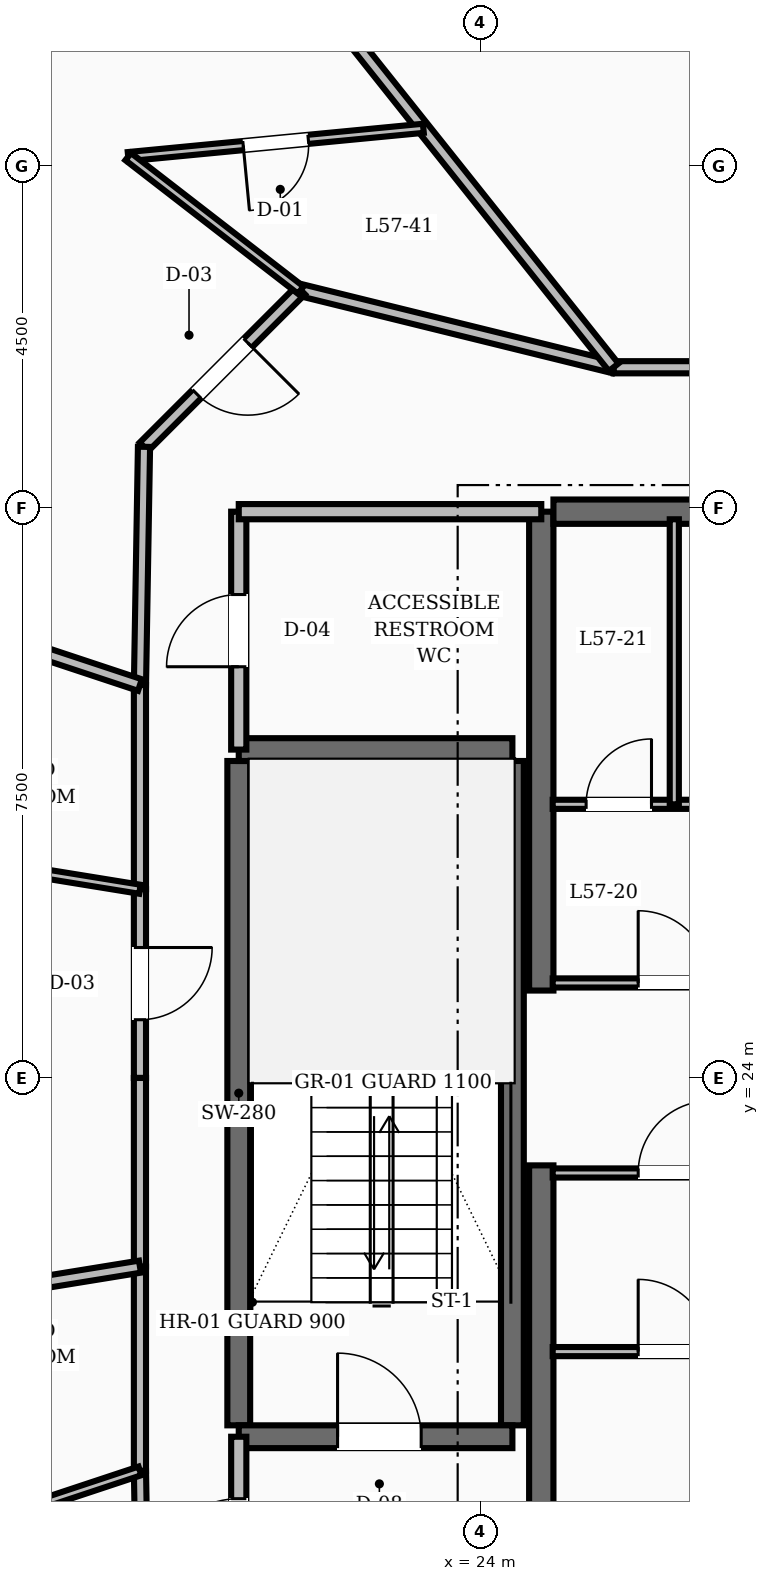
"""IFC4 building model, lengths in metres.
Left out: names, types, materials, properties, quantities, classifications, styles, units other than length and angle.
Written with IfcOpenShell. Run it as: python <this file> out.ifc"""

import sys

from ifc_helpers import new_model, si_unit, direction, frame, frame_2d, origin, place, context, subcontext, project, spatial, rectangle, extrude, element, fill, save


model = new_model("IFC4")
c1 = context("Model", 3, precision=1e-05, world=origin(), true_north=direction((0.0, 1.0)))
c2 = subcontext(c1, "Body", "Model", "MODEL_VIEW")
j1 = project(units=[si_unit("LENGTHUNIT", "METRE"), si_unit("PLANEANGLEUNIT", "RADIAN")], contexts=[c1])
p1 = place(None, origin())
s1 = spatial("IfcSite", under=j1, at=p1, CompositionType="ELEMENT")
p2 = place(p1, origin())
s2 = spatial("IfcBuilding", under=s1, at=p2, CompositionType="ELEMENT")
p3 = place(p2, frame((0.0, 0.0, 222.0)))
s3 = spatial("IfcBuildingStorey", under=s2, at=p3, CompositionType="ELEMENT", Elevation=222.0)
for number, where, z_axis, x_axis in (
    (1, (24.8, 16.55, 0.0), (0.0, 0.0, 1.0), (0.0, 1.0, 0.0)),
    (2, (24.8, 25.15, 0.0), (0.0, 0.0, 1.0), (0.0, 1.0, 0.0)),
):
    element("IfcWall", number, at=place(p3, frame(where, z_axis=z_axis, x_axis=x_axis)), inside=s3, PredefinedType="SHEAR", context=c2, shape_type="SweptSolid", body=[
        extrude(rectangle(XDim=6.3, YDim=0.32, at=frame_2d((3.15, 0.0))), origin(), (0.0, 0.0, 1.0), 3.6),
    ])
p4 = place(p3, frame((24.96, 31.45, 0.0), z_axis=(0.0, 0.0, 1.0), x_axis=(1.0, 0.0, 0.0)))
e3 = element("IfcWall", 3, at=p4, inside=s3, PredefinedType="SHEAR", context=c2, shape_type="SweptSolid", body=[
    extrude(rectangle(XDim=3.24, YDim=0.32, at=frame_2d((1.62, 0.0))), origin(), (0.0, 0.0, 1.0), 3.6),
])
for number, where, z_axis, x_axis in (
    (4, (20.82, 19.43, 0.0), (0.0, 0.0, 1.0), (0.0, 1.0, 0.0)),
    (5, (24.42, 19.43, 0.0), (0.0, 0.0, 1.0), (0.0, 1.0, 0.0)),
):
    element("IfcWall", number, at=place(p3, frame(where, z_axis=z_axis, x_axis=x_axis)), inside=s3, PredefinedType="SHEAR", context=c2, shape_type="SweptSolid", body=[
        extrude(rectangle(XDim=8.74, YDim=0.3, at=frame_2d((4.37, 0.0))), origin(), (0.0, 0.0, 1.0), 3.6),
    ])
p5 = place(p3, frame((20.82, 19.28, 0.0), z_axis=(0.0, 0.0, 1.0), x_axis=(1.0, 0.0, 0.0)))
e6 = element("IfcWall", 6, at=p5, inside=s3, PredefinedType="SHEAR", context=c2, shape_type="SweptSolid", body=[
    extrude(rectangle(XDim=3.6, YDim=0.3, at=frame_2d((1.8, 0.0))), origin(), (0.0, 0.0, 1.0), 3.6),
])
p6 = place(p5, frame((1.3, 0.0, 0.0)))
e7 = element("IfcOpeningElement", 7, at=p6, cuts=e6, PredefinedType="OPENING", context=c2, shape_type="SweptSolid", body=[
    extrude(rectangle(XDim=1.1, YDim=2.1, at=frame_2d((0.55, 1.05))), frame((0.0, 0.16, 0.0), z_axis=(0.0, -1.0, 0.0), x_axis=(1.0, 0.0, 0.0)), (0.0, 0.0, 1.0), 0.32),
])
p7 = place(p3, frame((20.82, 28.32, 0.0), z_axis=(0.0, 0.0, 1.0), x_axis=(1.0, 0.0, 0.0)))
e8 = element("IfcWall", 8, at=p7, inside=s3, PredefinedType="SHEAR", context=c2, shape_type="SweptSolid", body=[
    extrude(rectangle(XDim=3.6, YDim=0.3, at=frame_2d((1.8, 0.0))), origin(), (0.0, 0.0, 1.0), 3.6),
])
p8 = place(p3, frame((20.82, 16.55, 0.0), z_axis=(0.0, 0.0, 1.0), x_axis=(0.0, 1.0, 0.0)))
e9 = element("IfcWall", 9, at=p8, inside=s3, PredefinedType="SOLIDWALL", context=c2, shape_type="SweptSolid", body=[
    extrude(rectangle(XDim=2.73, YDim=0.2, at=frame_2d((1.365, 0.0))), origin(), (0.0, 0.0, 1.0), 2.87),
])
p9 = place(p8, frame((0.815, 0.0, 0.0)))
e10 = element("IfcOpeningElement", 10, at=p9, cuts=e9, PredefinedType="OPENING", context=c2, shape_type="SweptSolid", body=[
    extrude(rectangle(XDim=1.1, YDim=2.1, at=frame_2d((0.55, 1.05))), frame((0.0, 0.11, 0.0), z_axis=(0.0, -1.0, 0.0), x_axis=(1.0, 0.0, 0.0)), (0.0, 0.0, 1.0), 0.22),
])
p10 = place(p3, frame((20.82, 28.32, 0.0), z_axis=(0.0, 0.0, 1.0), x_axis=(0.0, 1.0, 0.0)))
e11 = element("IfcWall", 11, at=p10, inside=s3, PredefinedType="SOLIDWALL", context=c2, shape_type="SweptSolid", body=[
    extrude(rectangle(XDim=3.13, YDim=0.2, at=frame_2d((1.565, 0.0))), origin(), (0.0, 0.0, 1.0), 2.87),
])
p11 = place(p10, frame((1.09, 0.0, 0.0)))
e12 = element("IfcOpeningElement", 12, at=p11, cuts=e11, PredefinedType="OPENING", context=c2, shape_type="SweptSolid", body=[
    extrude(rectangle(XDim=0.95, YDim=2.1, at=frame_2d((0.475, 1.05))), frame((0.0, 0.11, 0.0), z_axis=(0.0, -1.0, 0.0), x_axis=(1.0, 0.0, 0.0)), (0.0, 0.0, 1.0), 0.22),
])
p12 = place(p3, frame((20.82, 31.45, 0.0), z_axis=(0.0, 0.0, 1.0), x_axis=(1.0, 0.0, 0.0)))
e13 = element("IfcWall", 13, at=p12, inside=s3, PredefinedType="SOLIDWALL", context=c2, shape_type="SweptSolid", body=[
    extrude(rectangle(XDim=3.98, YDim=0.2, at=frame_2d((1.99, 0.0))), origin(), (0.0, 0.0, 1.0), 2.87),
])
p13 = place(p3, frame((24.95, 25.25, 0.0), z_axis=(0.0, 0.0, 1.0), x_axis=(1.0, 0.0, 0.0)))
e14 = element("IfcWall", 14, at=p13, inside=s3, PredefinedType="PARTITIONING", context=c2, shape_type="SweptSolid", body=[
    extrude(rectangle(XDim=3.2, YDim=0.12, at=frame_2d((1.6, 0.0))), origin(), (0.0, 0.0, 1.0), 2.87),
])
p14 = place(p13, frame((1.125, 0.0, 0.0)))
e15 = element("IfcOpeningElement", 15, at=p14, cuts=e14, PredefinedType="OPENING", context=c2, shape_type="SweptSolid", body=[
    extrude(rectangle(XDim=0.95, YDim=2.1, at=frame_2d((0.475, 1.05))), frame((0.0, 0.07, 0.0), z_axis=(0.0, -1.0, 0.0), x_axis=(1.0, 0.0, 0.0)), (0.0, 0.0, 1.0), 0.14),
])
p15 = place(p3, frame((24.95, 22.75, 0.0), z_axis=(0.0, 0.0, 1.0), x_axis=(1.0, 0.0, 0.0)))
e16 = element("IfcWall", 16, at=p15, inside=s3, PredefinedType="PARTITIONING", context=c2, shape_type="SweptSolid", body=[
    extrude(rectangle(XDim=3.2, YDim=0.12, at=frame_2d((1.6, 0.0))), origin(), (0.0, 0.0, 1.0), 2.87),
])
p16 = place(p15, frame((1.125, 0.0, 0.0)))
e17 = element("IfcOpeningElement", 17, at=p16, cuts=e16, PredefinedType="OPENING", context=c2, shape_type="SweptSolid", body=[
    extrude(rectangle(XDim=0.95, YDim=2.1, at=frame_2d((0.475, 1.05))), frame((0.0, 0.07, 0.0), z_axis=(0.0, -1.0, 0.0), x_axis=(1.0, 0.0, 0.0)), (0.0, 0.0, 1.0), 0.14),
])
p17 = place(p3, frame((24.95, 27.6, 0.0), z_axis=(0.0, 0.0, 1.0), x_axis=(1.0, 0.0, 0.0)))
e18 = element("IfcWall", 18, at=p17, inside=s3, PredefinedType="PARTITIONING", context=c2, shape_type="SweptSolid", body=[
    extrude(rectangle(XDim=3.2, YDim=0.12, at=frame_2d((1.6, 0.0))), origin(), (0.0, 0.0, 1.0), 2.87),
])
p18 = place(p17, frame((0.44, 0.0, 0.0)))
e19 = element("IfcOpeningElement", 19, at=p18, cuts=e18, PredefinedType="OPENING", context=c2, shape_type="SweptSolid", body=[
    extrude(rectangle(XDim=0.86, YDim=2.1, at=frame_2d((0.43, 1.05))), frame((0.0, 0.07, 0.0), z_axis=(0.0, -1.0, 0.0), x_axis=(1.0, 0.0, 0.0)), (0.0, 0.0, 1.0), 0.14),
])
p19 = place(p17, frame((1.9, 0.0, 0.0)))
e20 = element("IfcOpeningElement", 20, at=p19, cuts=e18, PredefinedType="OPENING", context=c2, shape_type="SweptSolid", body=[
    extrude(rectangle(XDim=0.86, YDim=2.1, at=frame_2d((0.43, 1.05))), frame((0.0, 0.07, 0.0), z_axis=(0.0, -1.0, 0.0), x_axis=(1.0, 0.0, 0.0)), (0.0, 0.0, 1.0), 0.14),
])
p20 = place(p3, frame((26.55, 27.6, 0.0), z_axis=(0.0, 0.0, 1.0), x_axis=(0.0, 1.0, 0.0)))
e21 = element("IfcWall", 21, at=p20, inside=s3, PredefinedType="PARTITIONING", context=c2, shape_type="SweptSolid", body=[
    extrude(rectangle(XDim=3.75, YDim=0.12, at=frame_2d((1.875, 0.0))), origin(), (0.0, 0.0, 1.0), 2.87),
])
p21 = place(p3, frame((24.95, 20.4, 0.0), z_axis=(0.0, 0.0, 1.0), x_axis=(1.0, 0.0, 0.0)))
e22 = element("IfcWall", 22, at=p21, inside=s3, PredefinedType="PARTITIONING", context=c2, shape_type="SweptSolid", body=[
    extrude(rectangle(XDim=3.2, YDim=0.12, at=frame_2d((1.6, 0.0))), origin(), (0.0, 0.0, 1.0), 2.87),
])
p22 = place(p21, frame((1.125, 0.0, 0.0)))
e23 = element("IfcOpeningElement", 23, at=p22, cuts=e22, PredefinedType="OPENING", context=c2, shape_type="SweptSolid", body=[
    extrude(rectangle(XDim=0.95, YDim=2.1, at=frame_2d((0.475, 1.05))), frame((0.0, 0.07, 0.0), z_axis=(0.0, -1.0, 0.0), x_axis=(1.0, 0.0, 0.0)), (0.0, 0.0, 1.0), 0.14),
])
p23 = place(p3, frame((28.127, 33.35, 0.0), z_axis=(0.0, 0.0, 1.0), x_axis=(-1.0, 0.0, 0.0)))
e24 = element("IfcWall", 24, at=p23, inside=s3, PredefinedType="SOLIDWALL", context=c2, shape_type="SweptSolid", body=[
    extrude(rectangle(XDim=2.375, YDim=0.16, at=frame_2d((1.188, 0.0))), origin(), (0.0, 0.0, 1.0), 2.87),
])
p24 = place(p3, frame((25.752, 33.35, 0.0), z_axis=(0.0, 0.0, 1.0), x_axis=(-0.970939799552, 0.239323850978, 0.0)))
e25 = element("IfcWall", 25, at=p24, inside=s3, PredefinedType="SOLIDWALL", context=c2, shape_type="SweptSolid", body=[
    extrude(rectangle(XDim=4.241, YDim=0.16, at=frame_2d((2.12, 0.0))), origin(), (0.0, 0.0, 1.0), 2.87),
])
p25 = place(p3, frame((21.635, 34.365, 0.0), z_axis=(0.0, 0.0, 1.0), x_axis=(-0.707106781187, -0.707106781187, 0.0)))
e26 = element("IfcWall", 26, at=p25, inside=s3, PredefinedType="SOLIDWALL", context=c2, shape_type="SweptSolid", body=[
    extrude(rectangle(XDim=2.916, YDim=0.16, at=frame_2d((1.458, 0.0))), origin(), (0.0, 0.0, 1.0), 2.87),
])
p26 = place(p25, frame((0.983, 0.0, 0.0)))
e27 = element("IfcOpeningElement", 27, at=p26, cuts=e26, PredefinedType="OPENING", context=c2, shape_type="SweptSolid", body=[
    extrude(rectangle(XDim=0.95, YDim=2.1, at=frame_2d((0.475, 1.05))), frame((0.0, 0.09, 0.0), z_axis=(0.0, -1.0, 0.0), x_axis=(1.0, 0.0, 0.0)), (0.0, 0.0, 1.0), 0.18),
])
p27 = place(p3, frame((19.573, 32.303, 0.0), z_axis=(0.0, 0.0, 1.0), x_axis=(-0.016981035134, -0.999855811828, 0.0)))
e28 = element("IfcWall", 28, at=p27, inside=s3, PredefinedType="SOLIDWALL", context=c2, shape_type="SweptSolid", body=[
    extrude(rectangle(XDim=3.134, YDim=0.16, at=frame_2d((1.567, 0.0))), origin(), (0.0, 0.0, 1.0), 2.87),
])
p28 = place(p3, frame((19.52, 29.169, 0.0), z_axis=(0.0, 0.0, 1.0), x_axis=(0.0, -1.0, 0.0)))
e29 = element("IfcWall", 29, at=p28, inside=s3, PredefinedType="SOLIDWALL", context=c2, shape_type="SweptSolid", body=[
    extrude(rectangle(XDim=2.687, YDim=0.16, at=frame_2d((1.344, 0.0))), origin(), (0.0, 0.0, 1.0), 2.87),
])
p29 = place(p3, frame((19.52, 26.482, 0.0), z_axis=(0.0, 0.0, 1.0), x_axis=(0.0, -1.0, 0.0)))
e30 = element("IfcWall", 30, at=p29, inside=s3, PredefinedType="SOLIDWALL", context=c2, shape_type="SweptSolid", body=[
    extrude(rectangle(XDim=2.482, YDim=0.16, at=frame_2d((1.241, 0.0))), origin(), (0.0, 0.0, 1.0), 2.87),
])
p30 = place(p29, frame((0.766, 0.0, 0.0)))
e31 = element("IfcOpeningElement", 31, at=p30, cuts=e30, PredefinedType="OPENING", context=c2, shape_type="SweptSolid", body=[
    extrude(rectangle(XDim=0.95, YDim=2.1, at=frame_2d((0.475, 1.05))), frame((0.0, 0.09, 0.0), z_axis=(0.0, -1.0, 0.0), x_axis=(1.0, 0.0, 0.0)), (0.0, 0.0, 1.0), 0.18),
])
p31 = place(p3, frame((19.52, 24.0, 0.0), z_axis=(0.0, 0.0, 1.0), x_axis=(0.0, -1.0, 0.0)))
e32 = element("IfcWall", 32, at=p31, inside=s3, PredefinedType="SOLIDWALL", context=c2, shape_type="SweptSolid", body=[
    extrude(rectangle(XDim=2.482, YDim=0.16, at=frame_2d((1.241, 0.0))), origin(), (0.0, 0.0, 1.0), 2.87),
])
p32 = place(p3, frame((19.52, 21.518, 0.0), z_axis=(0.0, 0.0, 1.0), x_axis=(0.0, -1.0, 0.0)))
e33 = element("IfcWall", 33, at=p32, inside=s3, PredefinedType="SOLIDWALL", context=c2, shape_type="SweptSolid", body=[
    extrude(rectangle(XDim=2.687, YDim=0.16, at=frame_2d((1.344, 0.0))), origin(), (0.0, 0.0, 1.0), 2.87),
])
p33 = place(p3, frame((19.52, 18.831, 0.0), z_axis=(0.0, 0.0, 1.0), x_axis=(0.016981035134, -0.999855811828, 0.0)))
e34 = element("IfcWall", 34, at=p33, inside=s3, PredefinedType="SOLIDWALL", context=c2, shape_type="SweptSolid", body=[
    extrude(rectangle(XDim=3.134, YDim=0.16, at=frame_2d((1.567, 0.0))), origin(), (0.0, 0.0, 1.0), 2.87),
])
p34 = place(p33, frame((1.092, 0.0, 0.0)))
e35 = element("IfcOpeningElement", 35, at=p34, cuts=e34, PredefinedType="OPENING", context=c2, shape_type="SweptSolid", body=[
    extrude(rectangle(XDim=0.95, YDim=2.1, at=frame_2d((0.475, 1.05))), frame((0.0, 0.09, 0.0), z_axis=(0.0, -1.0, 0.0), x_axis=(1.0, 0.0, 0.0)), (0.0, 0.0, 1.0), 0.18),
])
p35 = place(p3, frame((25.752, 33.35, 0.0), z_axis=(0.0, 0.0, 1.0), x_axis=(-0.623021929745, 0.782204369112, 0.0)))
e36 = element("IfcWall", 36, at=p35, inside=s3, PredefinedType="SOLIDWALL", context=c2, shape_type="SweptSolid", body=[
    extrude(rectangle(XDim=10.526, YDim=0.16, at=frame_2d((5.263, 0.0))), origin(), (0.0, 0.0, 1.0), 2.87),
])
p36 = place(p3, frame((23.249, 36.494, 0.0), z_axis=(0.0, 0.0, 1.0), x_axis=(-0.995435363516, -0.095438132111, 0.0)))
e37 = element("IfcWall", 37, at=p36, inside=s3, PredefinedType="PARTITIONING", context=c2, shape_type="SweptSolid", body=[
    extrude(rectangle(XDim=3.901, YDim=0.12, at=frame_2d((1.951, 0.0))), origin(), (0.0, 0.0, 1.0), 2.87),
])
p37 = place(p36, frame((1.521, 0.0, 0.0)))
e38 = element("IfcOpeningElement", 38, at=p37, cuts=e37, PredefinedType="OPENING", context=c2, shape_type="SweptSolid", body=[
    extrude(rectangle(XDim=0.86, YDim=2.1, at=frame_2d((0.43, 1.05))), frame((0.0, 0.07, 0.0), z_axis=(0.0, -1.0, 0.0), x_axis=(1.0, 0.0, 0.0)), (0.0, 0.0, 1.0), 0.14),
])
p38 = place(p3, frame((21.635, 34.365, 0.0), z_axis=(0.0, 0.0, 1.0), x_axis=(-0.790875111812, 0.61197757926, 0.0)))
e39 = element("IfcWall", 39, at=p38, inside=s3, PredefinedType="PARTITIONING", context=c2, shape_type="SweptSolid", body=[
    extrude(rectangle(XDim=2.87, YDim=0.12, at=frame_2d((1.435, 0.0))), origin(), (0.0, 0.0, 1.0), 2.87),
])
p39 = place(p3, frame((19.52, 29.169, 0.0), z_axis=(0.0, 0.0, 1.0), x_axis=(-0.949134247943, 0.314871687171, 0.0)))
e40 = element("IfcWall", 40, at=p39, inside=s3, PredefinedType="SOLIDWALL", context=c2, shape_type="SweptSolid", body=[
    extrude(rectangle(XDim=9.292, YDim=0.16, at=frame_2d((4.646, 0.0))), origin(), (0.0, 0.0, 1.0), 2.87),
])
p40 = place(p3, frame((19.52, 26.482, 0.0), z_axis=(0.0, 0.0, 1.0), x_axis=(-0.98708525511, 0.160195815001, 0.0)))
e41 = element("IfcWall", 41, at=p40, inside=s3, PredefinedType="PARTITIONING", context=c2, shape_type="SweptSolid", body=[
    extrude(rectangle(XDim=3.92, YDim=0.12, at=frame_2d((1.96, 0.0))), origin(), (0.0, 0.0, 1.0), 2.87),
])
p41 = place(p3, frame((19.52, 21.518, 0.0), z_axis=(0.0, 0.0, 1.0), x_axis=(-0.987086273653, -0.16018953888, 0.0)))
e42 = element("IfcWall", 42, at=p41, inside=s3, PredefinedType="SOLIDWALL", context=c2, shape_type="SweptSolid", body=[
    extrude(rectangle(XDim=10.265, YDim=0.16, at=frame_2d((5.132, 0.0))), origin(), (0.0, 0.0, 1.0), 2.87),
])
p42 = place(p3, frame((19.52, 18.831, 0.0), z_axis=(0.0, 0.0, 1.0), x_axis=(-0.949143073376, -0.314845082959, 0.0)))
e43 = element("IfcWall", 43, at=p42, inside=s3, PredefinedType="PARTITIONING", context=c2, shape_type="SweptSolid", body=[
    extrude(rectangle(XDim=3.55, YDim=0.12, at=frame_2d((1.775, 0.0))), origin(), (0.0, 0.0, 1.0), 2.87),
])
p43 = place(p6, origin())
e44 = element("IfcDoor", 44, at=p43, inside=s3, OperationType="SINGLE_SWING_LEFT", PredefinedType="DOOR", context=c2, shape_type="SweptSolid", body=[
    extrude(rectangle(XDim=1.1, YDim=2.1, at=frame_2d((0.55, 1.05))), frame((0.0, 0.025, 0.0), z_axis=(0.0, -1.0, 0.0), x_axis=(1.0, 0.0, 0.0)), (0.0, 0.0, 1.0), 0.05),
])
fill(e7, e44)
p44 = place(p9, origin())
e45 = element("IfcDoor", 45, at=p44, inside=s3, OperationType="SINGLE_SWING_LEFT", PredefinedType="DOOR", context=c2, shape_type="SweptSolid", body=[
    extrude(rectangle(XDim=1.1, YDim=2.1, at=frame_2d((0.55, 1.05))), frame((0.0, 0.025, 0.0), z_axis=(0.0, -1.0, 0.0), x_axis=(1.0, 0.0, 0.0)), (0.0, 0.0, 1.0), 0.05),
])
fill(e10, e45)
p45 = place(p11, origin())
e46 = element("IfcDoor", 46, at=p45, inside=s3, OperationType="SINGLE_SWING_LEFT", PredefinedType="DOOR", context=c2, shape_type="SweptSolid", body=[
    extrude(rectangle(XDim=0.95, YDim=2.1, at=frame_2d((0.475, 1.05))), frame((0.0, 0.025, 0.0), z_axis=(0.0, -1.0, 0.0), x_axis=(1.0, 0.0, 0.0)), (0.0, 0.0, 1.0), 0.05),
])
fill(e12, e46)
p46 = place(p14, origin())
e47 = element("IfcDoor", 47, at=p46, inside=s3, OperationType="SINGLE_SWING_LEFT", PredefinedType="DOOR", context=c2, shape_type="SweptSolid", body=[
    extrude(rectangle(XDim=0.95, YDim=2.1, at=frame_2d((0.475, 1.05))), frame((0.0, 0.025, 0.0), z_axis=(0.0, -1.0, 0.0), x_axis=(1.0, 0.0, 0.0)), (0.0, 0.0, 1.0), 0.05),
])
fill(e15, e47)
p47 = place(p18, origin())
e48 = element("IfcDoor", 48, at=p47, inside=s3, OperationType="SINGLE_SWING_RIGHT", PredefinedType="DOOR", context=c2, shape_type="SweptSolid", body=[
    extrude(rectangle(XDim=0.86, YDim=2.1, at=frame_2d((0.43, 1.05))), frame((0.0, 0.025, 0.0), z_axis=(0.0, -1.0, 0.0), x_axis=(1.0, 0.0, 0.0)), (0.0, 0.0, 1.0), 0.05),
])
fill(e19, e48)
p48 = place(p16, origin())
e49 = element("IfcDoor", 49, at=p48, inside=s3, OperationType="SINGLE_SWING_RIGHT", PredefinedType="DOOR", context=c2, shape_type="SweptSolid", body=[
    extrude(rectangle(XDim=0.95, YDim=2.1, at=frame_2d((0.475, 1.05))), frame((0.0, 0.025, 0.0), z_axis=(0.0, -1.0, 0.0), x_axis=(1.0, 0.0, 0.0)), (0.0, 0.0, 1.0), 0.05),
])
fill(e17, e49)
p49 = place(p22, origin())
e50 = element("IfcDoor", 50, at=p49, inside=s3, OperationType="SINGLE_SWING_LEFT", PredefinedType="DOOR", context=c2, shape_type="SweptSolid", body=[
    extrude(rectangle(XDim=0.95, YDim=2.1, at=frame_2d((0.475, 1.05))), frame((0.0, 0.025, 0.0), z_axis=(0.0, -1.0, 0.0), x_axis=(1.0, 0.0, 0.0)), (0.0, 0.0, 1.0), 0.05),
])
fill(e23, e50)
p50 = place(p37, origin())
e51 = element("IfcDoor", 51, at=p50, inside=s3, OperationType="SINGLE_SWING_RIGHT", PredefinedType="DOOR", context=c2, shape_type="SweptSolid", body=[
    extrude(rectangle(XDim=0.86, YDim=2.1, at=frame_2d((0.43, 1.05))), frame((0.0, 0.025, 0.0), z_axis=(0.0, -1.0, 0.0), x_axis=(1.0, 0.0, 0.0)), (0.0, 0.0, 1.0), 0.05),
])
fill(e38, e51)
p51 = place(p26, origin())
e52 = element("IfcDoor", 52, at=p51, inside=s3, OperationType="SINGLE_SWING_LEFT", PredefinedType="DOOR", context=c2, shape_type="SweptSolid", body=[
    extrude(rectangle(XDim=0.95, YDim=2.1, at=frame_2d((0.475, 1.05))), frame((0.0, 0.025, 0.0), z_axis=(0.0, -1.0, 0.0), x_axis=(1.0, 0.0, 0.0)), (0.0, 0.0, 1.0), 0.05),
])
fill(e27, e52)
p52 = place(p30, origin())
e53 = element("IfcDoor", 53, at=p52, inside=s3, OperationType="SINGLE_SWING_LEFT", PredefinedType="DOOR", context=c2, shape_type="SweptSolid", body=[
    extrude(rectangle(XDim=0.95, YDim=2.1, at=frame_2d((0.475, 1.05))), frame((0.0, 0.025, 0.0), z_axis=(0.0, -1.0, 0.0), x_axis=(1.0, 0.0, 0.0)), (0.0, 0.0, 1.0), 0.05),
])
fill(e31, e53)
save(model, sys.argv[1])
